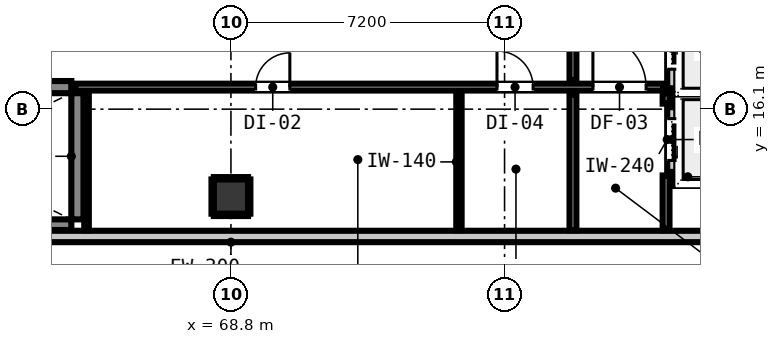
"""IFC4 building model, lengths in metres.
Left out: names, types, materials, properties, quantities, classifications, styles, units other than length and angle.
Written with IfcOpenShell. Run it as: python <this file> out.ifc"""

import sys

from ifc_helpers import new_model, si_unit, direction, frame, frame_2d, origin, origin_2d, place, context, subcontext, project, spatial, rectangle, circle, extrude, element, fill, save


model = new_model("IFC4")
c1 = context("Model", 3, precision=1e-05, world=origin(), true_north=direction((0.0, 1.0)))
c2 = subcontext(c1, "Body", "Model", "MODEL_VIEW")
j1 = project(units=[si_unit("LENGTHUNIT", "METRE"), si_unit("PLANEANGLEUNIT", "RADIAN")], contexts=[c1])
p1 = place(None, origin())
s1 = spatial("IfcSite", under=j1, at=p1, CompositionType="ELEMENT")
p2 = place(p1, origin())
s2 = spatial("IfcBuilding", under=s1, at=p2, CompositionType="ELEMENT")
p3 = place(p2, frame((0.0, 0.0, 13.6)))
s3 = spatial("IfcBuildingStorey", under=s2, at=p3, CompositionType="ELEMENT", Elevation=13.6)
p4 = place(p3, frame((64.76, 13.2, 0.0), z_axis=(0.0, 0.0, 1.0), x_axis=(0.0, 1.0, 0.0)))
e1 = element("IfcWall", 1, at=p4, inside=s3, PredefinedType="SHEAR", context=c2, shape_type="SweptSolid", body=[
    extrude(rectangle(XDim=3.32, YDim=0.32, at=frame_2d((1.66, 0.0))), origin(), (0.0, 0.0, 1.0), 4.2),
])
p5 = place(p3, frame((56.2, 13.06, 0.0), z_axis=(0.0, 0.0, 1.0), x_axis=(1.0, 0.0, 0.0)))
e2 = element("IfcWall", 2, at=p5, inside=s3, PredefinedType="SHEAR", context=c2, shape_type="SweptSolid", body=[
    extrude(rectangle(XDim=8.4, YDim=0.28, at=frame_2d((4.2, 0.0))), origin(), (0.0, 0.0, 1.0), 4.2),
])
p6 = place(p3, frame((56.2, 16.68, 0.0), z_axis=(0.0, 0.0, 1.0), x_axis=(1.0, 0.0, 0.0)))
e3 = element("IfcWall", 3, at=p6, inside=s3, PredefinedType="SHEAR", context=c2, shape_type="SweptSolid", body=[
    extrude(rectangle(XDim=8.4, YDim=0.32, at=frame_2d((4.2, 0.0))), origin(), (0.0, 0.0, 1.0), 4.2),
])
p7 = place(p6, frame((0.23, 0.0, 0.0)))
e4 = element("IfcOpeningElement", 4, at=p7, cuts=e3, PredefinedType="OPENING", context=c2, shape_type="SweptSolid", body=[
    extrude(rectangle(XDim=1.1, YDim=2.15, at=frame_2d((0.55, 1.075))), frame((0.0, 0.17, 0.0), z_axis=(0.0, -1.0, 0.0), x_axis=(1.0, 0.0, 0.0)), (0.0, 0.0, 1.0), 0.34),
])
p8 = place(p3, frame((68.8, 13.8, 0.0), z_axis=(0.0, 0.0, 1.0), x_axis=(1.0, 0.0, 0.0)))
e5 = element("IfcColumn", 5, at=p8, inside=s3, PredefinedType="COLUMN", context=c2, shape_type="SweptSolid", body=[
    extrude(circle(Radius=0.45, at=origin_2d()), origin(), (0.0, 0.0, 1.0), 4.2),
])
p9 = place(p3, frame((83.05, 12.75, 0.0), z_axis=(0.0, 0.0, 1.0), x_axis=(-1.0, 0.0, 0.0)))
e6 = element("IfcWall", 6, at=p9, inside=s3, PredefinedType="STANDARD", context=c2, shape_type="SweptSolid", body=[
    extrude(rectangle(XDim=28.5, YDim=0.3, at=frame_2d((14.25, 0.0))), origin(), (0.0, 0.0, 1.0), 3.92),
])
p10 = place(p3, frame((80.4, 14.2, 0.0), z_axis=(0.0, 0.0, 1.0), x_axis=(1.0, 0.0, 0.0)))
e7 = element("IfcWall", 7, at=p10, inside=s3, PredefinedType="PARTITIONING", context=c2, shape_type="SweptSolid", body=[
    extrude(rectangle(XDim=0.843, YDim=0.24, at=frame_2d((0.421, 0.0))), origin(), (0.0, 0.0, 1.0), 3.155),
])
p11 = place(p3, frame((80.4, 16.4, 0.0), z_axis=(0.0, 0.0, 1.0), x_axis=(1.0, 0.0, 0.0)))
e8 = element("IfcWall", 8, at=p11, inside=s3, PredefinedType="PARTITIONING", context=c2, shape_type="SweptSolid", body=[
    extrude(rectangle(XDim=2.2, YDim=0.24, at=frame_2d((1.1, 0.0))), origin(), (0.0, 0.0, 1.0), 3.78),
])
p12 = place(p3, frame((80.4, 14.448, 0.0), z_axis=(0.0, 0.0, 1.0), x_axis=(0.0, 1.0, 0.0)))
e9 = element("IfcWall", 9, at=p12, inside=s3, PredefinedType="PARTITIONING", context=c2, shape_type="SweptSolid", body=[
    extrude(rectangle(XDim=1.704, YDim=0.24, at=frame_2d((0.852, 0.0))), origin(), (0.0, 0.0, 1.0), 3.78),
])
p13 = place(p12, frame((0.302, 0.0, 0.0)))
e10 = element("IfcOpeningElement", 10, at=p13, cuts=e9, PredefinedType="OPENING", context=c2, shape_type="SweptSolid", body=[
    extrude(rectangle(XDim=1.1, YDim=2.15, at=frame_2d((0.55, 1.075))), frame((0.0, 0.13, 0.0), z_axis=(0.0, -1.0, 0.0), x_axis=(1.0, 0.0, 0.0)), (0.0, 0.0, 1.0), 0.26),
])
p14 = place(p3, frame((80.4, 16.648, 0.0), z_axis=(0.0, 0.0, 1.0), x_axis=(0.0, 1.0, 0.0)))
e11 = element("IfcWall", 11, at=p14, inside=s3, PredefinedType="PARTITIONING", context=c2, shape_type="SweptSolid", body=[
    extrude(rectangle(XDim=1.904, YDim=0.24, at=frame_2d((0.952, 0.0))), origin(), (0.0, 0.0, 1.0), 3.78),
])
p15 = place(p14, frame((0.502, 0.0, 0.0)))
e12 = element("IfcOpeningElement", 12, at=p15, cuts=e11, PredefinedType="OPENING", context=c2, shape_type="SweptSolid", body=[
    extrude(rectangle(XDim=1.1, YDim=2.15, at=frame_2d((0.55, 1.075))), frame((0.0, 0.13, 0.0), z_axis=(0.0, -1.0, 0.0), x_axis=(1.0, 0.0, 0.0)), (0.0, 0.0, 1.0), 0.26),
])
p16 = place(p3, frame((64.7, 16.68, 0.0), z_axis=(0.0, 0.0, 1.0), x_axis=(1.0, 0.0, 0.0)))
e13 = element("IfcWall", 13, at=p16, inside=s3, PredefinedType="PARTITIONING", context=c2, shape_type="SweptSolid", body=[
    extrude(rectangle(XDim=15.482, YDim=0.18, at=frame_2d((7.741, 0.0))), origin(), (0.0, 0.0, 1.0), 3.78),
])
p17 = place(p16, frame((13.625, 0.0, 0.0)))
e14 = element("IfcOpeningElement", 14, at=p17, cuts=e13, PredefinedType="OPENING", context=c2, shape_type="SweptSolid", body=[
    extrude(rectangle(XDim=1.4, YDim=2.15, at=frame_2d((0.7, 1.075))), frame((0.0, 0.1, 0.0), z_axis=(0.0, -1.0, 0.0), x_axis=(1.0, 0.0, 0.0)), (0.0, 0.0, 1.0), 0.2),
])
p18 = place(p16, frame((4.75, 0.0, 0.0)))
e15 = element("IfcOpeningElement", 15, at=p18, cuts=e13, PredefinedType="OPENING", context=c2, shape_type="SweptSolid", body=[
    extrude(rectangle(XDim=0.9, YDim=2.1, at=frame_2d((0.45, 1.05))), frame((0.0, 0.1, 0.0), z_axis=(0.0, -1.0, 0.0), x_axis=(1.0, 0.0, 0.0)), (0.0, 0.0, 1.0), 0.2),
])
p19 = place(p16, frame((11.101, 0.0, 0.0)))
e16 = element("IfcOpeningElement", 16, at=p19, cuts=e13, PredefinedType="OPENING", context=c2, shape_type="SweptSolid", body=[
    extrude(rectangle(XDim=0.95, YDim=2.1, at=frame_2d((0.475, 1.05))), frame((0.0, 0.1, 0.0), z_axis=(0.0, -1.0, 0.0), x_axis=(1.0, 0.0, 0.0)), (0.0, 0.0, 1.0), 0.2),
])
p20 = place(p3, frame((77.8, 12.912, 0.0), z_axis=(0.0, 0.0, 1.0), x_axis=(0.0, 1.0, 0.0)))
e17 = element("IfcWall", 17, at=p20, inside=s3, PredefinedType="PARTITIONING", context=c2, shape_type="SweptSolid", body=[
    extrude(rectangle(XDim=3.58, YDim=0.18, at=frame_2d((1.79, 0.0))), origin(), (0.0, 0.0, 1.0), 3.78),
])
p21 = place(p3, frame((77.8, 16.868, 0.0), z_axis=(0.0, 0.0, 1.0), x_axis=(0.0, 1.0, 0.0)))
e18 = element("IfcWall", 18, at=p21, inside=s3, PredefinedType="PARTITIONING", context=c2, shape_type="SweptSolid", body=[
    extrude(rectangle(XDim=3.544, YDim=0.18, at=frame_2d((1.772, 0.0))), origin(), (0.0, 0.0, 1.0), 3.78),
])
p22 = place(p21, frame((1.096, 0.0, 0.0)))
e19 = element("IfcOpeningElement", 19, at=p22, cuts=e18, PredefinedType="OPENING", context=c2, shape_type="SweptSolid", body=[
    extrude(rectangle(XDim=1.4, YDim=2.15, at=frame_2d((0.7, 1.075))), frame((0.0, 0.1, 0.0), z_axis=(0.0, -1.0, 0.0), x_axis=(1.0, 0.0, 0.0)), (0.0, 0.0, 1.0), 0.2),
])
p23 = place(p3, frame((80.25, 12.912, 0.0), z_axis=(0.0, 0.0, 1.0), x_axis=(0.0, 1.0, 0.0)))
e20 = element("IfcWall", 20, at=p23, inside=s3, PredefinedType="PARTITIONING", context=c2, shape_type="SweptSolid", body=[
    extrude(rectangle(XDim=1.443, YDim=0.18, at=frame_2d((0.721, 0.0))), origin(), (0.0, 0.0, 1.0), 3.78),
])
p24 = place(p3, frame((80.25, 16.245, 0.0), z_axis=(0.0, 0.0, 1.0), x_axis=(0.0, 1.0, 0.0)))
e21 = element("IfcWall", 21, at=p24, inside=s3, PredefinedType="PARTITIONING", context=c2, shape_type="SweptSolid", body=[
    extrude(rectangle(XDim=0.275, YDim=0.18, at=frame_2d((0.137, 0.0))), origin(), (0.0, 0.0, 1.0), 3.78),
])
p25 = place(p3, frame((74.8, 12.912, 0.0), z_axis=(0.0, 0.0, 1.0), x_axis=(0.0, 1.0, 0.0)))
e22 = element("IfcWall", 22, at=p25, inside=s3, PredefinedType="PARTITIONING", context=c2, shape_type="SweptSolid", body=[
    extrude(rectangle(XDim=3.6, YDim=0.14, at=frame_2d((1.8, 0.0))), origin(), (0.0, 0.0, 1.0), 3.78),
])
p26 = place(p3, frame((65.0, 12.912, 0.0), z_axis=(0.0, 0.0, 1.0), x_axis=(0.0, 1.0, 0.0)))
e23 = element("IfcWall", 23, at=p26, inside=s3, PredefinedType="PARTITIONING", context=c2, shape_type="SweptSolid", body=[
    extrude(rectangle(XDim=3.61, YDim=0.12, at=frame_2d((1.805, 0.0))), origin(), (0.0, 0.0, 1.0), 3.78),
])
for number, where, z_axis, x_axis in (
    (24, (68.35, 13.318, 0.0), (0.0, 0.0, 1.0), (1.0, 0.0, 0.0)),
    (25, (68.35, 14.282, 0.0), (0.0, 0.0, 1.0), (1.0, 0.0, 0.0)),
    (26, (68.318, 13.35, 0.0), (0.0, 0.0, 1.0), (0.0, 1.0, 0.0)),
    (27, (69.282, 13.35, 0.0), (0.0, 0.0, 1.0), (0.0, 1.0, 0.0)),
):
    element("IfcWall", number, at=place(p3, frame(where, z_axis=z_axis, x_axis=x_axis)), inside=s3, PredefinedType="PARTITIONING", context=c2, shape_type="SweptSolid", body=[
        extrude(rectangle(XDim=0.9, YDim=0.06, at=frame_2d((0.45, 0.0))), origin(), (0.0, 0.0, 1.0), 1.45),
    ])
p27 = place(p13, origin())
e28 = element("IfcDoor", 28, at=p27, inside=s3, OperationType="SLIDING_TO_LEFT", PredefinedType="DOOR", context=c2, shape_type="SweptSolid", body=[
    extrude(rectangle(XDim=1.1, YDim=2.15, at=frame_2d((0.55, 1.075))), frame((0.0, 0.025, 0.0), z_axis=(0.0, -1.0, 0.0), x_axis=(1.0, 0.0, 0.0)), (0.0, 0.0, 1.0), 0.05),
])
fill(e10, e28)
p28 = place(p15, origin())
e29 = element("IfcDoor", 29, at=p28, inside=s3, OperationType="SLIDING_TO_RIGHT", PredefinedType="DOOR", context=c2, shape_type="SweptSolid", body=[
    extrude(rectangle(XDim=1.1, YDim=2.15, at=frame_2d((0.55, 1.075))), frame((0.0, 0.025, 0.0), z_axis=(0.0, -1.0, 0.0), x_axis=(1.0, 0.0, 0.0)), (0.0, 0.0, 1.0), 0.05),
])
fill(e12, e29)
p29 = place(p17, origin())
e30 = element("IfcDoor", 30, at=p29, inside=s3, OperationType="SINGLE_SWING_LEFT", PredefinedType="DOOR", context=c2, shape_type="SweptSolid", body=[
    extrude(rectangle(XDim=1.4, YDim=2.15, at=frame_2d((0.7, 1.075))), frame((0.0, 0.025, 0.0), z_axis=(0.0, -1.0, 0.0), x_axis=(1.0, 0.0, 0.0)), (0.0, 0.0, 1.0), 0.05),
])
fill(e14, e30)
p30 = place(p18, origin())
e31 = element("IfcDoor", 31, at=p30, inside=s3, OperationType="SINGLE_SWING_RIGHT", PredefinedType="DOOR", context=c2, shape_type="SweptSolid", body=[
    extrude(rectangle(XDim=0.9, YDim=2.1, at=frame_2d((0.45, 1.05))), frame((0.0, 0.025, 0.0), z_axis=(0.0, -1.0, 0.0), x_axis=(1.0, 0.0, 0.0)), (0.0, 0.0, 1.0), 0.05),
])
fill(e15, e31)
p31 = place(p19, origin())
e32 = element("IfcDoor", 32, at=p31, inside=s3, OperationType="SINGLE_SWING_LEFT", PredefinedType="DOOR", context=c2, shape_type="SweptSolid", body=[
    extrude(rectangle(XDim=0.95, YDim=2.1, at=frame_2d((0.475, 1.05))), frame((0.0, 0.025, 0.0), z_axis=(0.0, -1.0, 0.0), x_axis=(1.0, 0.0, 0.0)), (0.0, 0.0, 1.0), 0.05),
])
fill(e16, e32)
save(model, sys.argv[1])
